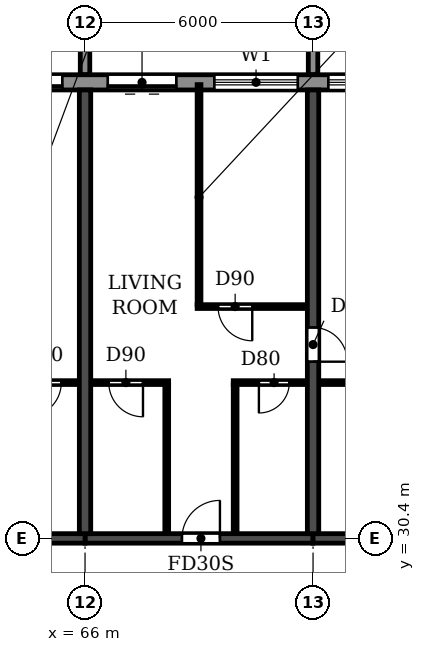
"""IFC4 building model, lengths in metres.
Left out: names, types, materials, properties, quantities, classifications, styles, units other than length and angle.
Written with IfcOpenShell. Run it as: python <this file> out.ifc"""

import sys

from ifc_helpers import new_model, si_unit, direction, frame, frame_2d, origin, place, context, subcontext, project, spatial, polyline, rectangle, outline, extrude, source, transform, mapped, element, fill, save


model = new_model("IFC4")
c1 = context("Model", 3, precision=1e-05, world=origin(), true_north=direction((0.0, 1.0)))
c2 = subcontext(c1, "Body", "Model", "MODEL_VIEW")
j1 = project(units=[si_unit("LENGTHUNIT", "METRE"), si_unit("PLANEANGLEUNIT", "RADIAN")], contexts=[c1])
p1 = place(None, origin())
s1 = spatial("IfcSite", under=j1, at=p1, CompositionType="ELEMENT")
p2 = place(p1, origin())
s2 = spatial("IfcBuilding", under=s1, at=p2, CompositionType="ELEMENT")
p3 = place(p2, frame((0.0, 0.0, 122.4)))
s3 = spatial("IfcBuildingStorey", under=s2, at=p3, CompositionType="ELEMENT", Elevation=122.4)
p4 = place(p3, frame((66.0, 30.525, 0.0), z_axis=(0.0, 0.0, 1.0), x_axis=(0.0, 1.0, 0.0)))
e1 = element("IfcWall", 1, at=p4, inside=s3, PredefinedType="SHEAR", context=c2, shape_type="SweptSolid", body=[
    extrude(rectangle(XDim=11.675, YDim=0.3, at=frame_2d((5.837, 0.0))), origin(), (0.0, 0.0, 1.0), 3.07),
])
p5 = place(p3, frame((72.0, 30.525, 0.0), z_axis=(0.0, 0.0, 1.0), x_axis=(0.0, 1.0, 0.0)))
e2 = element("IfcWall", 2, at=p5, inside=s3, PredefinedType="SHEAR", context=c2, shape_type="SweptSolid", body=[
    extrude(rectangle(XDim=11.675, YDim=0.3, at=frame_2d((5.837, 0.0))), origin(), (0.0, 0.0, 1.0), 3.07),
])
p6 = place(p5, frame((4.525, 0.0, 0.0)))
e3 = element("IfcOpeningElement", 3, at=p6, cuts=e2, PredefinedType="OPENING", context=c2, shape_type="SweptSolid", body=[
    extrude(rectangle(XDim=0.9, YDim=2.1, at=frame_2d((0.45, 1.05))), frame((0.0, 0.16, 0.0), z_axis=(0.0, -1.0, 0.0), x_axis=(1.0, 0.0, 0.0)), (0.0, 0.0, 1.0), 0.32),
])
p7 = place(p3, frame((60.0, 30.4, 0.0), z_axis=(0.0, 0.0, 1.0), x_axis=(1.0, 0.0, 0.0)))
e4 = element("IfcWall", 4, at=p7, inside=s3, PredefinedType="SHEAR", context=c2, shape_type="SweptSolid", body=[
    extrude(rectangle(XDim=6.0, YDim=0.25, at=frame_2d((3.0, 0.0))), origin(), (0.0, 0.0, 1.0), 2.47),
])
p8 = place(p7, frame((2.45, 0.0, 0.0)))
e5 = element("IfcOpeningElement", 5, at=p8, cuts=e4, PredefinedType="OPENING", context=c2, shape_type="SweptSolid", body=[
    extrude(rectangle(XDim=1.0, YDim=2.1, at=frame_2d((0.5, 1.05))), frame((0.0, 0.135, 0.0), z_axis=(0.0, -1.0, 0.0), x_axis=(1.0, 0.0, 0.0)), (0.0, 0.0, 1.0), 0.27),
])
p9 = place(p3, frame((66.0, 30.4, 0.0), z_axis=(0.0, 0.0, 1.0), x_axis=(1.0, 0.0, 0.0)))
e6 = element("IfcWall", 6, at=p9, inside=s3, PredefinedType="SHEAR", context=c2, shape_type="SweptSolid", body=[
    extrude(rectangle(XDim=6.0, YDim=0.25, at=frame_2d((3.0, 0.0))), origin(), (0.0, 0.0, 1.0), 2.47),
])
p10 = place(p9, frame((2.55, 0.0, 0.0)))
e7 = element("IfcOpeningElement", 7, at=p10, cuts=e6, PredefinedType="OPENING", context=c2, shape_type="SweptSolid", body=[
    extrude(rectangle(XDim=1.0, YDim=2.1, at=frame_2d((0.5, 1.05))), frame((0.0, 0.135, 0.0), z_axis=(0.0, -1.0, 0.0), x_axis=(1.0, 0.0, 0.0)), (0.0, 0.0, 1.0), 0.27),
])
p11 = place(p3, frame((72.0, 30.4, 0.0), z_axis=(0.0, 0.0, 1.0), x_axis=(1.0, 0.0, 0.0)))
e8 = element("IfcWall", 8, at=p11, inside=s3, PredefinedType="SHEAR", context=c2, shape_type="SweptSolid", body=[
    extrude(rectangle(XDim=6.0, YDim=0.25, at=frame_2d((3.0, 0.0))), origin(), (0.0, 0.0, 1.0), 2.47),
])
p12 = place(p3, frame((85.317, 42.4, 0.0), z_axis=(0.0, 0.0, 1.0), x_axis=(-1.0, 0.0, 0.0)))
e9 = element("IfcWall", 9, at=p12, inside=s3, PredefinedType="STANDARD", context=c2, shape_type="SweptSolid", body=[
    extrude(rectangle(XDim=68.634, YDim=0.4, at=frame_2d((34.317, 0.0))), origin(), (0.0, 0.0, 1.0), 3.07),
])
p13 = place(p12, frame((64.717, 0.0, 0.9)))
e10 = element("IfcOpeningElement", 10, at=p13, cuts=e9, PredefinedType="OPENING", context=c2, shape_type="SweptSolid", body=[
    extrude(rectangle(XDim=2.2, YDim=1.5, at=frame_2d((1.1, 0.75))), frame((0.0, 0.21, 0.0), z_axis=(0.0, -1.0, 0.0), x_axis=(1.0, 0.0, 0.0)), (0.0, 0.0, 1.0), 0.42),
])
p14 = place(p12, frame((61.917, 0.0, 0.0)))
e11 = element("IfcOpeningElement", 11, at=p14, cuts=e9, PredefinedType="OPENING", context=c2, shape_type="SweptSolid", body=[
    extrude(rectangle(XDim=1.8, YDim=2.4, at=frame_2d((0.9, 1.2))), frame((0.0, 0.21, 0.0), z_axis=(0.0, -1.0, 0.0), x_axis=(1.0, 0.0, 0.0)), (0.0, 0.0, 1.0), 0.42),
])
p15 = place(p12, frame((58.717, 0.0, 0.9)))
e12 = element("IfcOpeningElement", 12, at=p15, cuts=e9, PredefinedType="OPENING", context=c2, shape_type="SweptSolid", body=[
    extrude(rectangle(XDim=2.2, YDim=1.5, at=frame_2d((1.1, 0.75))), frame((0.0, 0.21, 0.0), z_axis=(0.0, -1.0, 0.0), x_axis=(1.0, 0.0, 0.0)), (0.0, 0.0, 1.0), 0.42),
])
p16 = place(p12, frame((55.917, 0.0, 0.0)))
e13 = element("IfcOpeningElement", 13, at=p16, cuts=e9, PredefinedType="OPENING", context=c2, shape_type="SweptSolid", body=[
    extrude(rectangle(XDim=1.8, YDim=2.4, at=frame_2d((0.9, 1.2))), frame((0.0, 0.21, 0.0), z_axis=(0.0, -1.0, 0.0), x_axis=(1.0, 0.0, 0.0)), (0.0, 0.0, 1.0), 0.42),
])
p17 = place(p12, frame((52.717, 0.0, 0.9)))
e14 = element("IfcOpeningElement", 14, at=p17, cuts=e9, PredefinedType="OPENING", context=c2, shape_type="SweptSolid", body=[
    extrude(rectangle(XDim=2.2, YDim=1.5, at=frame_2d((1.1, 0.75))), frame((0.0, 0.21, 0.0), z_axis=(0.0, -1.0, 0.0), x_axis=(1.0, 0.0, 0.0)), (0.0, 0.0, 1.0), 0.42),
])
p18 = place(p12, frame((49.917, 0.0, 0.0)))
e15 = element("IfcOpeningElement", 15, at=p18, cuts=e9, PredefinedType="OPENING", context=c2, shape_type="SweptSolid", body=[
    extrude(rectangle(XDim=1.8, YDim=2.4, at=frame_2d((0.9, 1.2))), frame((0.0, 0.21, 0.0), z_axis=(0.0, -1.0, 0.0), x_axis=(1.0, 0.0, 0.0)), (0.0, 0.0, 1.0), 0.42),
])
p19 = place(p12, frame((46.717, 0.0, 0.9)))
e16 = element("IfcOpeningElement", 16, at=p19, cuts=e9, PredefinedType="OPENING", context=c2, shape_type="SweptSolid", body=[
    extrude(rectangle(XDim=2.2, YDim=1.5, at=frame_2d((1.1, 0.75))), frame((0.0, 0.21, 0.0), z_axis=(0.0, -1.0, 0.0), x_axis=(1.0, 0.0, 0.0)), (0.0, 0.0, 1.0), 0.42),
])
p20 = place(p12, frame((43.917, 0.0, 0.0)))
e17 = element("IfcOpeningElement", 17, at=p20, cuts=e9, PredefinedType="OPENING", context=c2, shape_type="SweptSolid", body=[
    extrude(rectangle(XDim=1.8, YDim=2.4, at=frame_2d((0.9, 1.2))), frame((0.0, 0.21, 0.0), z_axis=(0.0, -1.0, 0.0), x_axis=(1.0, 0.0, 0.0)), (0.0, 0.0, 1.0), 0.42),
])
p21 = place(p12, frame((40.717, 0.0, 0.9)))
e18 = element("IfcOpeningElement", 18, at=p21, cuts=e9, PredefinedType="OPENING", context=c2, shape_type="SweptSolid", body=[
    extrude(rectangle(XDim=2.2, YDim=1.5, at=frame_2d((1.1, 0.75))), frame((0.0, 0.21, 0.0), z_axis=(0.0, -1.0, 0.0), x_axis=(1.0, 0.0, 0.0)), (0.0, 0.0, 1.0), 0.42),
])
p22 = place(p12, frame((37.717, 0.0, 0.9)))
e19 = element("IfcOpeningElement", 19, at=p22, cuts=e9, PredefinedType="OPENING", context=c2, shape_type="SweptSolid", body=[
    extrude(rectangle(XDim=2.2, YDim=1.5, at=frame_2d((1.1, 0.75))), frame((0.0, 0.21, 0.0), z_axis=(0.0, -1.0, 0.0), x_axis=(1.0, 0.0, 0.0)), (0.0, 0.0, 1.0), 0.42),
])
p23 = place(p12, frame((34.917, 0.0, 0.0)))
e20 = element("IfcOpeningElement", 20, at=p23, cuts=e9, PredefinedType="OPENING", context=c2, shape_type="SweptSolid", body=[
    extrude(rectangle(XDim=1.8, YDim=2.4, at=frame_2d((0.9, 1.2))), frame((0.0, 0.21, 0.0), z_axis=(0.0, -1.0, 0.0), x_axis=(1.0, 0.0, 0.0)), (0.0, 0.0, 1.0), 0.42),
])
p24 = place(p12, frame((31.717, 0.0, 0.9)))
e21 = element("IfcOpeningElement", 21, at=p24, cuts=e9, PredefinedType="OPENING", context=c2, shape_type="SweptSolid", body=[
    extrude(rectangle(XDim=2.2, YDim=1.5, at=frame_2d((1.1, 0.75))), frame((0.0, 0.21, 0.0), z_axis=(0.0, -1.0, 0.0), x_axis=(1.0, 0.0, 0.0)), (0.0, 0.0, 1.0), 0.42),
])
p25 = place(p12, frame((28.717, 0.0, 0.9)))
e22 = element("IfcOpeningElement", 22, at=p25, cuts=e9, PredefinedType="OPENING", context=c2, shape_type="SweptSolid", body=[
    extrude(rectangle(XDim=2.2, YDim=1.5, at=frame_2d((1.1, 0.75))), frame((0.0, 0.21, 0.0), z_axis=(0.0, -1.0, 0.0), x_axis=(1.0, 0.0, 0.0)), (0.0, 0.0, 1.0), 0.42),
])
p26 = place(p12, frame((25.717, 0.0, 0.9)))
e23 = element("IfcOpeningElement", 23, at=p26, cuts=e9, PredefinedType="OPENING", context=c2, shape_type="SweptSolid", body=[
    extrude(rectangle(XDim=2.2, YDim=1.5, at=frame_2d((1.1, 0.75))), frame((0.0, 0.21, 0.0), z_axis=(0.0, -1.0, 0.0), x_axis=(1.0, 0.0, 0.0)), (0.0, 0.0, 1.0), 0.42),
])
p27 = place(p12, frame((22.717, 0.0, 0.9)))
e24 = element("IfcOpeningElement", 24, at=p27, cuts=e9, PredefinedType="OPENING", context=c2, shape_type="SweptSolid", body=[
    extrude(rectangle(XDim=2.2, YDim=1.5, at=frame_2d((1.1, 0.75))), frame((0.0, 0.21, 0.0), z_axis=(0.0, -1.0, 0.0), x_axis=(1.0, 0.0, 0.0)), (0.0, 0.0, 1.0), 0.42),
])
p28 = place(p12, frame((19.917, 0.0, 0.0)))
e25 = element("IfcOpeningElement", 25, at=p28, cuts=e9, PredefinedType="OPENING", context=c2, shape_type="SweptSolid", body=[
    extrude(rectangle(XDim=1.8, YDim=2.4, at=frame_2d((0.9, 1.2))), frame((0.0, 0.21, 0.0), z_axis=(0.0, -1.0, 0.0), x_axis=(1.0, 0.0, 0.0)), (0.0, 0.0, 1.0), 0.42),
])
p29 = place(p12, frame((16.917, 0.0, 0.0)))
e26 = element("IfcOpeningElement", 26, at=p29, cuts=e9, PredefinedType="OPENING", context=c2, shape_type="SweptSolid", body=[
    extrude(rectangle(XDim=1.8, YDim=2.4, at=frame_2d((0.9, 1.2))), frame((0.0, 0.21, 0.0), z_axis=(0.0, -1.0, 0.0), x_axis=(1.0, 0.0, 0.0)), (0.0, 0.0, 1.0), 0.42),
])
p30 = place(p12, frame((13.717, 0.0, 0.9)))
e27 = element("IfcOpeningElement", 27, at=p30, cuts=e9, PredefinedType="OPENING", context=c2, shape_type="SweptSolid", body=[
    extrude(rectangle(XDim=2.2, YDim=1.5, at=frame_2d((1.1, 0.75))), frame((0.0, 0.21, 0.0), z_axis=(0.0, -1.0, 0.0), x_axis=(1.0, 0.0, 0.0)), (0.0, 0.0, 1.0), 0.42),
])
p31 = place(p12, frame((10.717, 0.0, 0.9)))
e28 = element("IfcOpeningElement", 28, at=p31, cuts=e9, PredefinedType="OPENING", context=c2, shape_type="SweptSolid", body=[
    extrude(rectangle(XDim=2.2, YDim=1.5, at=frame_2d((1.1, 0.75))), frame((0.0, 0.21, 0.0), z_axis=(0.0, -1.0, 0.0), x_axis=(1.0, 0.0, 0.0)), (0.0, 0.0, 1.0), 0.42),
])
p32 = place(p12, frame((7.717, 0.0, 0.9)))
e29 = element("IfcOpeningElement", 29, at=p32, cuts=e9, PredefinedType="OPENING", context=c2, shape_type="SweptSolid", body=[
    extrude(rectangle(XDim=2.2, YDim=1.5, at=frame_2d((1.1, 0.75))), frame((0.0, 0.21, 0.0), z_axis=(0.0, -1.0, 0.0), x_axis=(1.0, 0.0, 0.0)), (0.0, 0.0, 1.0), 0.42),
])
p33 = place(p12, frame((4.917, 0.0, 0.0)))
e30 = element("IfcOpeningElement", 30, at=p33, cuts=e9, PredefinedType="OPENING", context=c2, shape_type="SweptSolid", body=[
    extrude(rectangle(XDim=1.8, YDim=2.4, at=frame_2d((0.9, 1.2))), frame((0.0, 0.21, 0.0), z_axis=(0.0, -1.0, 0.0), x_axis=(1.0, 0.0, 0.0)), (0.0, 0.0, 1.0), 0.42),
])
p34 = place(p12, frame((1.717, 0.0, 0.9)))
e31 = element("IfcOpeningElement", 31, at=p34, cuts=e9, PredefinedType="OPENING", context=c2, shape_type="SweptSolid", body=[
    extrude(rectangle(XDim=2.2, YDim=1.5, at=frame_2d((1.1, 0.75))), frame((0.0, 0.21, 0.0), z_axis=(0.0, -1.0, 0.0), x_axis=(1.0, 0.0, 0.0)), (0.0, 0.0, 1.0), 0.42),
])
m1 = source(origin(), c2, "Body", "SweptSolid", [
    extrude(outline(polyline([(0.0, 0.0), (0.25, 0.0), (0.25, 3.1), (0.0, 3.1), (0.0, 0.0)])), origin(), (0.0, 0.0, 1.0), 3.1),
])
for number, where in (
    (32, (65.875, 42.6, 0.0)),
    (33, (71.875, 42.6, 0.0)),
):
    element("IfcWall", number, at=place(p3, frame(where)), inside=s3, PredefinedType="STANDARD", context=c2, shape_type="MappedRepresentation", body=[
        mapped(m1, transform((0.0, 0.0, 0.0))),
    ])
p35 = place(p3, frame((63.8, 34.5, 0.0), z_axis=(0.0, 0.0, 1.0), x_axis=(1.0, 0.0, 0.0)))
e34 = element("IfcWall", 34, at=p35, inside=s3, PredefinedType="PARTITIONING", context=c2, shape_type="SweptSolid", body=[
    extrude(rectangle(XDim=2.04, YDim=0.1, at=frame_2d((1.02, 0.0))), origin(), (0.0, 0.0, 1.0), 3.07),
])
p36 = place(p35, frame((0.675, 0.0, 0.0)))
e35 = element("IfcOpeningElement", 35, at=p36, cuts=e34, PredefinedType="OPENING", context=c2, shape_type="SweptSolid", body=[
    extrude(rectangle(XDim=0.9, YDim=2.1, at=frame_2d((0.45, 1.05))), frame((0.0, 0.06, 0.0), z_axis=(0.0, -1.0, 0.0), x_axis=(1.0, 0.0, 0.0)), (0.0, 0.0, 1.0), 0.12),
])
p37 = place(p3, frame((66.16, 34.5, 0.0), z_axis=(0.0, 0.0, 1.0), x_axis=(1.0, 0.0, 0.0)))
e36 = element("IfcWall", 36, at=p37, inside=s3, PredefinedType="PARTITIONING", context=c2, shape_type="SweptSolid", body=[
    extrude(rectangle(XDim=2.04, YDim=0.1, at=frame_2d((1.02, 0.0))), origin(), (0.0, 0.0, 1.0), 3.07),
])
p38 = place(p37, frame((0.465, 0.0, 0.0)))
e37 = element("IfcOpeningElement", 37, at=p38, cuts=e36, PredefinedType="OPENING", context=c2, shape_type="SweptSolid", body=[
    extrude(rectangle(XDim=0.9, YDim=2.1, at=frame_2d((0.45, 1.05))), frame((0.0, 0.06, 0.0), z_axis=(0.0, -1.0, 0.0), x_axis=(1.0, 0.0, 0.0)), (0.0, 0.0, 1.0), 0.12),
])
p39 = place(p3, frame((69.9, 34.5, 0.0), z_axis=(0.0, 0.0, 1.0), x_axis=(1.0, 0.0, 0.0)))
e38 = element("IfcWall", 38, at=p39, inside=s3, PredefinedType="PARTITIONING", context=c2, shape_type="SweptSolid", body=[
    extrude(rectangle(XDim=1.94, YDim=0.1, at=frame_2d((0.97, 0.0))), origin(), (0.0, 0.0, 1.0), 3.07),
])
p40 = place(p39, frame((0.675, 0.0, 0.0)))
e39 = element("IfcOpeningElement", 39, at=p40, cuts=e38, PredefinedType="OPENING", context=c2, shape_type="SweptSolid", body=[
    extrude(rectangle(XDim=0.8, YDim=2.1, at=frame_2d((0.4, 1.05))), frame((0.0, 0.06, 0.0), z_axis=(0.0, -1.0, 0.0), x_axis=(1.0, 0.0, 0.0)), (0.0, 0.0, 1.0), 0.12),
])
p41 = place(p3, frame((72.16, 34.5, 0.0), z_axis=(0.0, 0.0, 1.0), x_axis=(1.0, 0.0, 0.0)))
e40 = element("IfcWall", 40, at=p41, inside=s3, PredefinedType="PARTITIONING", context=c2, shape_type="SweptSolid", body=[
    extrude(rectangle(XDim=2.74, YDim=0.1, at=frame_2d((1.37, 0.0))), origin(), (0.0, 0.0, 1.0), 3.07),
])
p42 = place(p41, frame((0.94, 0.0, 0.0)))
e41 = element("IfcOpeningElement", 41, at=p42, cuts=e40, PredefinedType="OPENING", context=c2, shape_type="SweptSolid", body=[
    extrude(rectangle(XDim=0.8, YDim=2.1, at=frame_2d((0.4, 1.05))), frame((0.0, 0.06, 0.0), z_axis=(0.0, -1.0, 0.0), x_axis=(1.0, 0.0, 0.0)), (0.0, 0.0, 1.0), 0.12),
])
p43 = place(p3, frame((68.95, 36.5, 0.0), z_axis=(0.0, 0.0, 1.0), x_axis=(1.0, 0.0, 0.0)))
e42 = element("IfcWall", 42, at=p43, inside=s3, PredefinedType="PARTITIONING", context=c2, shape_type="SweptSolid", body=[
    extrude(rectangle(XDim=2.89, YDim=0.1, at=frame_2d((1.445, 0.0))), origin(), (0.0, 0.0, 1.0), 3.07),
])
p44 = place(p43, frame((0.55, 0.0, 0.0)))
e43 = element("IfcOpeningElement", 43, at=p44, cuts=e42, PredefinedType="OPENING", context=c2, shape_type="SweptSolid", body=[
    extrude(rectangle(XDim=0.9, YDim=2.1, at=frame_2d((0.45, 1.05))), frame((0.0, 0.06, 0.0), z_axis=(0.0, -1.0, 0.0), x_axis=(1.0, 0.0, 0.0)), (0.0, 0.0, 1.0), 0.12),
])
p45 = place(p3, frame((68.15, 30.535, 0.0), z_axis=(0.0, 0.0, 1.0), x_axis=(0.0, 1.0, 0.0)))
e44 = element("IfcWall", 44, at=p45, inside=s3, PredefinedType="PARTITIONING", context=c2, shape_type="SweptSolid", body=[
    extrude(rectangle(XDim=3.915, YDim=0.1, at=frame_2d((1.958, 0.0))), origin(), (0.0, 0.0, 1.0), 3.07),
])
p46 = place(p3, frame((69.0, 36.55, 0.0), z_axis=(0.0, 0.0, 1.0), x_axis=(0.0, 1.0, 0.0)))
e45 = element("IfcWall", 45, at=p46, inside=s3, PredefinedType="PARTITIONING", context=c2, shape_type="SweptSolid", body=[
    extrude(rectangle(XDim=5.79, YDim=0.1, at=frame_2d((2.895, 0.0))), origin(), (0.0, 0.0, 1.0), 3.07),
])
p47 = place(p3, frame((69.95, 30.535, 0.0), z_axis=(0.0, 0.0, 1.0), x_axis=(0.0, 1.0, 0.0)))
e46 = element("IfcWall", 46, at=p47, inside=s3, PredefinedType="PARTITIONING", context=c2, shape_type="SweptSolid", body=[
    extrude(rectangle(XDim=3.915, YDim=0.1, at=frame_2d((1.958, 0.0))), origin(), (0.0, 0.0, 1.0), 3.07),
])
p48 = place(p28, origin())
e47 = element("IfcDoor", 47, at=p48, inside=s3, OperationType="DOUBLE_DOOR_SLIDING", PredefinedType="DOOR", context=c2, shape_type="SweptSolid", body=[
    extrude(rectangle(XDim=1.8, YDim=2.4, at=frame_2d((0.9, 1.2))), frame((0.0, 0.025, 0.0), z_axis=(0.0, -1.0, 0.0), x_axis=(1.0, 0.0, 0.0)), (0.0, 0.0, 1.0), 0.05),
])
fill(e25, e47)
p49 = place(p29, origin())
e48 = element("IfcDoor", 48, at=p49, inside=s3, OperationType="DOUBLE_DOOR_SLIDING", PredefinedType="DOOR", context=c2, shape_type="SweptSolid", body=[
    extrude(rectangle(XDim=1.8, YDim=2.4, at=frame_2d((0.9, 1.2))), frame((0.0, 0.025, 0.0), z_axis=(0.0, -1.0, 0.0), x_axis=(1.0, 0.0, 0.0)), (0.0, 0.0, 1.0), 0.05),
])
fill(e26, e48)
p50 = place(p30, origin())
e49 = element("IfcWindow", 49, at=p50, inside=s3, PartitioningType="DOUBLE_PANEL_HORIZONTAL", PredefinedType="WINDOW", context=c2, shape_type="SweptSolid", body=[
    extrude(rectangle(XDim=2.2, YDim=1.5, at=frame_2d((1.1, 0.75))), frame((0.0, 0.03, 0.0), z_axis=(0.0, -1.0, 0.0), x_axis=(1.0, 0.0, 0.0)), (0.0, 0.0, 1.0), 0.06),
])
fill(e27, e49)
p51 = place(p31, origin())
e50 = element("IfcWindow", 50, at=p51, inside=s3, PartitioningType="DOUBLE_PANEL_HORIZONTAL", PredefinedType="WINDOW", context=c2, shape_type="SweptSolid", body=[
    extrude(rectangle(XDim=2.2, YDim=1.5, at=frame_2d((1.1, 0.75))), frame((0.0, 0.03, 0.0), z_axis=(0.0, -1.0, 0.0), x_axis=(1.0, 0.0, 0.0)), (0.0, 0.0, 1.0), 0.06),
])
fill(e28, e50)
p52 = place(p36, frame((0.9, 0.0, 0.0), z_axis=(0.0, 0.0, 1.0), x_axis=(-1.0, 0.0, 0.0)))
e51 = element("IfcDoor", 51, at=p52, inside=s3, OperationType="SINGLE_SWING_RIGHT", PredefinedType="DOOR", context=c2, shape_type="SweptSolid", body=[
    extrude(rectangle(XDim=0.9, YDim=2.1, at=frame_2d((0.45, 1.05))), frame((0.0, 0.025, 0.0), z_axis=(0.0, -1.0, 0.0), x_axis=(1.0, 0.0, 0.0)), (0.0, 0.0, 1.0), 0.05),
])
fill(e35, e51)
p53 = place(p38, frame((0.9, 0.0, 0.0), z_axis=(0.0, 0.0, 1.0), x_axis=(-1.0, 0.0, 0.0)))
e52 = element("IfcDoor", 52, at=p53, inside=s3, OperationType="SINGLE_SWING_LEFT", PredefinedType="DOOR", context=c2, shape_type="SweptSolid", body=[
    extrude(rectangle(XDim=0.9, YDim=2.1, at=frame_2d((0.45, 1.05))), frame((0.0, 0.025, 0.0), z_axis=(0.0, -1.0, 0.0), x_axis=(1.0, 0.0, 0.0)), (0.0, 0.0, 1.0), 0.05),
])
fill(e37, e52)
p54 = place(p10, origin())
e53 = element("IfcDoor", 53, at=p54, inside=s3, OperationType="SINGLE_SWING_RIGHT", PredefinedType="DOOR", context=c2, shape_type="SweptSolid", body=[
    extrude(rectangle(XDim=1.0, YDim=2.1, at=frame_2d((0.5, 1.05))), frame((0.0, 0.025, 0.0), z_axis=(0.0, -1.0, 0.0), x_axis=(1.0, 0.0, 0.0)), (0.0, 0.0, 1.0), 0.05),
])
fill(e7, e53)
p55 = place(p44, frame((0.9, 0.0, 0.0), z_axis=(0.0, 0.0, 1.0), x_axis=(-1.0, 0.0, 0.0)))
e54 = element("IfcDoor", 54, at=p55, inside=s3, OperationType="SINGLE_SWING_LEFT", PredefinedType="DOOR", context=c2, shape_type="SweptSolid", body=[
    extrude(rectangle(XDim=0.9, YDim=2.1, at=frame_2d((0.45, 1.05))), frame((0.0, 0.025, 0.0), z_axis=(0.0, -1.0, 0.0), x_axis=(1.0, 0.0, 0.0)), (0.0, 0.0, 1.0), 0.05),
])
fill(e43, e54)
p56 = place(p40, frame((0.8, 0.0, 0.0), z_axis=(0.0, 0.0, 1.0), x_axis=(-1.0, 0.0, 0.0)))
e55 = element("IfcDoor", 55, at=p56, inside=s3, OperationType="SINGLE_SWING_RIGHT", PredefinedType="DOOR", context=c2, shape_type="SweptSolid", body=[
    extrude(rectangle(XDim=0.8, YDim=2.1, at=frame_2d((0.4, 1.05))), frame((0.0, 0.025, 0.0), z_axis=(0.0, -1.0, 0.0), x_axis=(1.0, 0.0, 0.0)), (0.0, 0.0, 1.0), 0.05),
])
fill(e39, e55)
p57 = place(p6, frame((0.9, 0.0, 0.0), z_axis=(0.0, 0.0, 1.0), x_axis=(-1.0, 0.0, 0.0)))
e56 = element("IfcDoor", 56, at=p57, inside=s3, OperationType="SINGLE_SWING_RIGHT", PredefinedType="DOOR", context=c2, shape_type="SweptSolid", body=[
    extrude(rectangle(XDim=0.9, YDim=2.1, at=frame_2d((0.45, 1.05))), frame((0.0, 0.025, 0.0), z_axis=(0.0, -1.0, 0.0), x_axis=(1.0, 0.0, 0.0)), (0.0, 0.0, 1.0), 0.05),
])
fill(e3, e56)
save(model, sys.argv[1])
